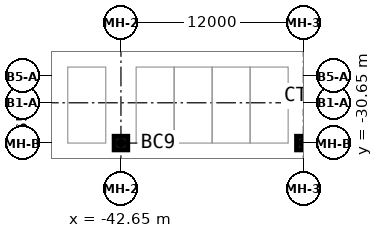
"""IFC4 building model, lengths in metres.
Left out: names, types, materials, properties, quantities, classifications, styles, units other than length and angle.
Written with IfcOpenShell. Run it as: python <this file> out.ifc"""

import sys

from ifc_helpers import new_model, si_unit, direction, frame, origin, origin_2d, place, context, subcontext, project, spatial, rectangle, extrude, source, transform, mapped, element, save


model = new_model("IFC4")
c1 = context("Model", 3, precision=1e-05, world=origin(), true_north=direction((0.0, 1.0)))
c2 = subcontext(c1, "Body", "Model", "MODEL_VIEW")
j1 = project(units=[si_unit("LENGTHUNIT", "METRE"), si_unit("PLANEANGLEUNIT", "RADIAN")], contexts=[c1])
p1 = place(None, origin())
s1 = spatial("IfcSite", under=j1, at=p1, CompositionType="ELEMENT")
p2 = place(p1, origin())
s2 = spatial("IfcBuilding", under=s1, at=p2, CompositionType="ELEMENT")
p3 = place(p2, frame((0.0, 0.0, -4.5)))
s3 = spatial("IfcBuildingStorey", under=s2, at=p3, CompositionType="ELEMENT", Elevation=-4.5)
m1 = source(origin(), c2, "Body", "SweptSolid", [
    extrude(rectangle(XDim=0.9, YDim=0.9, at=origin_2d()), origin(), (0.0, 0.0, 1.0), 4.5),
])
for number, where, z_axis, x_axis in (
    (1, (-42.65, -30.65, 0.0), (0.0, 0.0, 1.0), (1.0, 0.0, 0.0)),
    (2, (-30.65, -30.65, 0.0), (0.0, 0.0, 1.0), (1.0, 0.0, 0.0)),
):
    element("IfcColumn", number, at=place(p3, frame(where, z_axis=z_axis, x_axis=x_axis)), inside=s3, PredefinedType="COLUMN", context=c2, shape_type="MappedRepresentation", body=[
        mapped(m1, transform((0.0, 0.0, 0.0))),
    ])
save(model, sys.argv[1])
